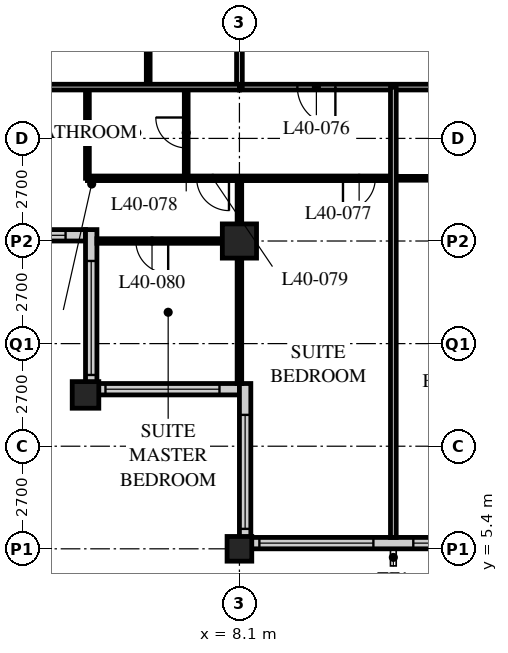
"""IFC4 building model, lengths in metres.
Left out: names, types, materials, properties, quantities, classifications, styles, units other than length and angle.
Written with IfcOpenShell. Run it as: python <this file> out.ifc"""

import sys

from ifc_helpers import new_model, si_unit, direction, frame, frame_2d, origin, origin_2d, place, context, subcontext, project, spatial, rectangle, hollow_rectangle, extrude, element, fill, save


model = new_model("IFC4")
c1 = context("Model", 3, precision=1e-05, world=origin(), true_north=direction((0.0, 1.0)))
c2 = subcontext(c1, "Body", "Model", "MODEL_VIEW")
j1 = project(units=[si_unit("LENGTHUNIT", "METRE"), si_unit("PLANEANGLEUNIT", "RADIAN")], contexts=[c1])
p1 = place(None, origin())
s1 = spatial("IfcSite", under=j1, at=p1, CompositionType="ELEMENT")
p2 = place(p1, origin())
s2 = spatial("IfcBuilding", under=s1, at=p2, CompositionType="ELEMENT")
p3 = place(p2, frame((0.0, 0.0, 154.4)))
s3 = spatial("IfcBuildingStorey", under=s2, at=p3, CompositionType="ELEMENT", Elevation=154.4)
p4 = place(p3, frame((4.05, 9.45, 0.0), z_axis=(0.0, 0.0, 1.0), x_axis=(1.0, 0.0, 0.0)))
e1 = element("IfcColumn", 1, at=p4, inside=s3, PredefinedType="COLUMN", context=c2, shape_type="SweptSolid", body=[
    extrude(hollow_rectangle(XDim=0.7, YDim=0.7, WallThickness=0.07, at=origin_2d()), origin(), (0.0, 0.0, 1.0), 3.4),
])
p5 = place(p3, frame((8.1, 5.4, 0.0), z_axis=(0.0, 0.0, 1.0), x_axis=(1.0, 0.0, 0.0)))
e2 = element("IfcColumn", 2, at=p5, inside=s3, PredefinedType="COLUMN", context=c2, shape_type="SweptSolid", body=[
    extrude(hollow_rectangle(XDim=0.65, YDim=0.65, WallThickness=0.055, at=origin_2d()), origin(), (0.0, 0.0, 1.0), 3.4),
])
p6 = place(p3, frame((8.1, 13.5, 0.0), z_axis=(0.0, 0.0, 1.0), x_axis=(1.0, 0.0, 0.0)))
e3 = element("IfcColumn", 3, at=p6, inside=s3, PredefinedType="COLUMN", context=c2, shape_type="SweptSolid", body=[
    extrude(hollow_rectangle(XDim=0.9, YDim=0.9, WallThickness=0.1, at=origin_2d()), origin(), (0.0, 0.0, 1.0), 3.4),
])
p7 = place(p3, frame((8.4, 5.55, 0.0), z_axis=(0.0, 0.0, 1.0), x_axis=(1.0, 0.0, 0.0)))
e4 = element("IfcWall", 4, at=p7, inside=s3, PredefinedType="SOLIDWALL", context=c2, shape_type="SweptSolid", body=[
    extrude(rectangle(XDim=40.2, YDim=0.3, at=frame_2d((20.1, 0.0))), origin(), (0.0, 0.0, 1.0), 2.15),
])
p8 = place(p7, frame((0.225, 0.0, 0.9)))
e5 = element("IfcOpeningElement", 5, at=p8, cuts=e4, PredefinedType="OPENING", context=c2, shape_type="SweptSolid", body=[
    extrude(rectangle(XDim=3.0, YDim=1.2, at=frame_2d((1.5, 0.6))), frame((0.0, 0.16, 0.0), z_axis=(0.0, -1.0, 0.0), x_axis=(1.0, 0.0, 0.0)), (0.0, 0.0, 1.0), 0.32),
])
p9 = place(p7, frame((4.275, 0.0, 0.9)))
e6 = element("IfcOpeningElement", 6, at=p9, cuts=e4, PredefinedType="OPENING", context=c2, shape_type="SweptSolid", body=[
    extrude(rectangle(XDim=3.0, YDim=1.2, at=frame_2d((1.5, 0.6))), frame((0.0, 0.16, 0.0), z_axis=(0.0, -1.0, 0.0), x_axis=(1.0, 0.0, 0.0)), (0.0, 0.0, 1.0), 0.32),
])
p10 = place(p7, frame((8.325, 0.0, 0.9)))
e7 = element("IfcOpeningElement", 7, at=p10, cuts=e4, PredefinedType="OPENING", context=c2, shape_type="SweptSolid", body=[
    extrude(rectangle(XDim=3.0, YDim=1.2, at=frame_2d((1.5, 0.6))), frame((0.0, 0.16, 0.0), z_axis=(0.0, -1.0, 0.0), x_axis=(1.0, 0.0, 0.0)), (0.0, 0.0, 1.0), 0.32),
])
p11 = place(p7, frame((12.375, 0.0, 0.9)))
e8 = element("IfcOpeningElement", 8, at=p11, cuts=e4, PredefinedType="OPENING", context=c2, shape_type="SweptSolid", body=[
    extrude(rectangle(XDim=3.0, YDim=1.2, at=frame_2d((1.5, 0.6))), frame((0.0, 0.16, 0.0), z_axis=(0.0, -1.0, 0.0), x_axis=(1.0, 0.0, 0.0)), (0.0, 0.0, 1.0), 0.32),
])
p12 = place(p7, frame((16.425, 0.0, 0.9)))
e9 = element("IfcOpeningElement", 9, at=p12, cuts=e4, PredefinedType="OPENING", context=c2, shape_type="SweptSolid", body=[
    extrude(rectangle(XDim=3.0, YDim=1.2, at=frame_2d((1.5, 0.6))), frame((0.0, 0.16, 0.0), z_axis=(0.0, -1.0, 0.0), x_axis=(1.0, 0.0, 0.0)), (0.0, 0.0, 1.0), 0.32),
])
p13 = place(p7, frame((20.475, 0.0, 0.9)))
e10 = element("IfcOpeningElement", 10, at=p13, cuts=e4, PredefinedType="OPENING", context=c2, shape_type="SweptSolid", body=[
    extrude(rectangle(XDim=3.0, YDim=1.2, at=frame_2d((1.5, 0.6))), frame((0.0, 0.16, 0.0), z_axis=(0.0, -1.0, 0.0), x_axis=(1.0, 0.0, 0.0)), (0.0, 0.0, 1.0), 0.32),
])
p14 = place(p7, frame((24.525, 0.0, 0.9)))
e11 = element("IfcOpeningElement", 11, at=p14, cuts=e4, PredefinedType="OPENING", context=c2, shape_type="SweptSolid", body=[
    extrude(rectangle(XDim=3.0, YDim=1.2, at=frame_2d((1.5, 0.6))), frame((0.0, 0.16, 0.0), z_axis=(0.0, -1.0, 0.0), x_axis=(1.0, 0.0, 0.0)), (0.0, 0.0, 1.0), 0.32),
])
p15 = place(p7, frame((28.575, 0.0, 0.9)))
e12 = element("IfcOpeningElement", 12, at=p15, cuts=e4, PredefinedType="OPENING", context=c2, shape_type="SweptSolid", body=[
    extrude(rectangle(XDim=3.0, YDim=1.2, at=frame_2d((1.5, 0.6))), frame((0.0, 0.16, 0.0), z_axis=(0.0, -1.0, 0.0), x_axis=(1.0, 0.0, 0.0)), (0.0, 0.0, 1.0), 0.32),
])
p16 = place(p7, frame((32.625, 0.0, 0.9)))
e13 = element("IfcOpeningElement", 13, at=p16, cuts=e4, PredefinedType="OPENING", context=c2, shape_type="SweptSolid", body=[
    extrude(rectangle(XDim=3.0, YDim=1.2, at=frame_2d((1.5, 0.6))), frame((0.0, 0.16, 0.0), z_axis=(0.0, -1.0, 0.0), x_axis=(1.0, 0.0, 0.0)), (0.0, 0.0, 1.0), 0.32),
])
p17 = place(p7, frame((36.675, 0.0, 0.9)))
e14 = element("IfcOpeningElement", 14, at=p17, cuts=e4, PredefinedType="OPENING", context=c2, shape_type="SweptSolid", body=[
    extrude(rectangle(XDim=3.0, YDim=1.2, at=frame_2d((1.5, 0.6))), frame((0.0, 0.16, 0.0), z_axis=(0.0, -1.0, 0.0), x_axis=(1.0, 0.0, 0.0)), (0.0, 0.0, 1.0), 0.32),
])
p18 = place(p3, frame((0.3, 13.65, 0.0), z_axis=(0.0, 0.0, 1.0), x_axis=(1.0, 0.0, 0.0)))
e15 = element("IfcWall", 15, at=p18, inside=s3, PredefinedType="SOLIDWALL", context=c2, shape_type="SweptSolid", body=[
    extrude(rectangle(XDim=3.75, YDim=0.3, at=frame_2d((1.875, 0.0))), origin(), (0.0, 0.0, 1.0), 3.15),
])
p19 = place(p18, frame((0.225, 0.0, 0.9)))
e16 = element("IfcOpeningElement", 16, at=p19, cuts=e15, PredefinedType="OPENING", context=c2, shape_type="SweptSolid", body=[
    extrude(rectangle(XDim=3.0, YDim=1.2, at=frame_2d((1.5, 0.6))), frame((0.0, 0.16, 0.0), z_axis=(0.0, -1.0, 0.0), x_axis=(1.0, 0.0, 0.0)), (0.0, 0.0, 1.0), 0.32),
])
p20 = place(p3, frame((4.2, 13.8, 0.0), z_axis=(0.0, 0.0, 1.0), x_axis=(0.0, -1.0, 0.0)))
e17 = element("IfcWall", 17, at=p20, inside=s3, PredefinedType="SOLIDWALL", context=c2, shape_type="SweptSolid", body=[
    extrude(rectangle(XDim=4.35, YDim=0.3, at=frame_2d((2.175, 0.0))), origin(), (0.0, 0.0, 1.0), 2.45),
])
p21 = place(p20, frame((0.825, 0.0, 0.9)))
e18 = element("IfcOpeningElement", 18, at=p21, cuts=e17, PredefinedType="OPENING", context=c2, shape_type="SweptSolid", body=[
    extrude(rectangle(XDim=3.0, YDim=1.2, at=frame_2d((1.5, 0.6))), frame((0.0, 0.16, 0.0), z_axis=(0.0, -1.0, 0.0), x_axis=(1.0, 0.0, 0.0)), (0.0, 0.0, 1.0), 0.32),
])
p22 = place(p3, frame((4.35, 9.6, 0.0), z_axis=(0.0, 0.0, 1.0), x_axis=(1.0, 0.0, 0.0)))
e19 = element("IfcWall", 19, at=p22, inside=s3, PredefinedType="SOLIDWALL", context=c2, shape_type="SweptSolid", body=[
    extrude(rectangle(XDim=3.75, YDim=0.3, at=frame_2d((1.875, 0.0))), origin(), (0.0, 0.0, 1.0), 2.45),
])
p23 = place(p22, frame((0.225, 0.0, 0.9)))
e20 = element("IfcOpeningElement", 20, at=p23, cuts=e19, PredefinedType="OPENING", context=c2, shape_type="SweptSolid", body=[
    extrude(rectangle(XDim=3.0, YDim=1.2, at=frame_2d((1.5, 0.6))), frame((0.0, 0.16, 0.0), z_axis=(0.0, -1.0, 0.0), x_axis=(1.0, 0.0, 0.0)), (0.0, 0.0, 1.0), 0.32),
])
p24 = place(p3, frame((8.25, 9.75, 0.0), z_axis=(0.0, 0.0, 1.0), x_axis=(0.0, -1.0, 0.0)))
e21 = element("IfcWall", 21, at=p24, inside=s3, PredefinedType="SOLIDWALL", context=c2, shape_type="SweptSolid", body=[
    extrude(rectangle(XDim=4.35, YDim=0.3, at=frame_2d((2.175, 0.0))), origin(), (0.0, 0.0, 1.0), 2.15),
])
p25 = place(p24, frame((0.825, 0.0, 0.9)))
e22 = element("IfcOpeningElement", 22, at=p25, cuts=e21, PredefinedType="OPENING", context=c2, shape_type="SweptSolid", body=[
    extrude(rectangle(XDim=3.0, YDim=1.2, at=frame_2d((1.5, 0.6))), frame((0.0, 0.16, 0.0), z_axis=(0.0, -1.0, 0.0), x_axis=(1.0, 0.0, 0.0)), (0.0, 0.0, 1.0), 0.32),
])
p26 = place(p3, frame((8.1, 17.55, 0.0), z_axis=(0.0, 0.0, 1.0), x_axis=(1.0, 0.0, 0.0)))
e23 = element("IfcWall", 23, at=p26, inside=s3, PredefinedType="PARTITIONING", context=c2, shape_type="SweptSolid", body=[
    extrude(rectangle(XDim=40.5, YDim=0.15, at=frame_2d((20.25, 0.0))), origin(), (0.0, 0.0, 1.0), 3.15),
])
p27 = place(p26, frame((10.0, 0.0, 0.0)))
e24 = element("IfcOpeningElement", 24, at=p27, cuts=e23, PredefinedType="OPENING", context=c2, shape_type="SweptSolid", body=[
    extrude(rectangle(XDim=1.0, YDim=2.1, at=frame_2d((0.5, 1.05))), frame((0.0, 0.085, 0.0), z_axis=(0.0, -1.0, 0.0), x_axis=(1.0, 0.0, 0.0)), (0.0, 0.0, 1.0), 0.17),
])
p28 = place(p26, frame((22.15, 0.0, 0.0)))
e25 = element("IfcOpeningElement", 25, at=p28, cuts=e23, PredefinedType="OPENING", context=c2, shape_type="SweptSolid", body=[
    extrude(rectangle(XDim=1.0, YDim=2.1, at=frame_2d((0.5, 1.05))), frame((0.0, 0.085, 0.0), z_axis=(0.0, -1.0, 0.0), x_axis=(1.0, 0.0, 0.0)), (0.0, 0.0, 1.0), 0.17),
])
p29 = place(p26, frame((30.8, 0.0, 0.0)))
e26 = element("IfcOpeningElement", 26, at=p29, cuts=e23, PredefinedType="OPENING", context=c2, shape_type="SweptSolid", body=[
    extrude(rectangle(XDim=1.0, YDim=2.1, at=frame_2d((0.5, 1.05))), frame((0.0, 0.085, 0.0), z_axis=(0.0, -1.0, 0.0), x_axis=(1.0, 0.0, 0.0)), (0.0, 0.0, 1.0), 0.17),
])
p30 = place(p26, frame((34.85, 0.0, 0.0)))
e27 = element("IfcOpeningElement", 27, at=p30, cuts=e23, PredefinedType="OPENING", context=c2, shape_type="SweptSolid", body=[
    extrude(rectangle(XDim=1.0, YDim=2.1, at=frame_2d((0.5, 1.05))), frame((0.0, 0.085, 0.0), z_axis=(0.0, -1.0, 0.0), x_axis=(1.0, 0.0, 0.0)), (0.0, 0.0, 1.0), 0.17),
])
p31 = place(p26, frame((1.525, 0.0, 0.0)))
e28 = element("IfcOpeningElement", 28, at=p31, cuts=e23, PredefinedType="OPENING", context=c2, shape_type="SweptSolid", body=[
    extrude(rectangle(XDim=1.0, YDim=2.1, at=frame_2d((0.5, 1.05))), frame((0.0, 0.085, 0.0), z_axis=(0.0, -1.0, 0.0), x_axis=(1.0, 0.0, 0.0)), (0.0, 0.0, 1.0), 0.17),
])
p32 = place(p26, frame((37.975, 0.0, 0.0)))
e29 = element("IfcOpeningElement", 29, at=p32, cuts=e23, PredefinedType="OPENING", context=c2, shape_type="SweptSolid", body=[
    extrude(rectangle(XDim=1.0, YDim=2.1, at=frame_2d((0.5, 1.05))), frame((0.0, 0.085, 0.0), z_axis=(0.0, -1.0, 0.0), x_axis=(1.0, 0.0, 0.0)), (0.0, 0.0, 1.0), 0.17),
])
p33 = place(p3, frame((8.1, 17.55, 0.0), z_axis=(0.0, 0.0, 1.0), x_axis=(0.0, 1.0, 0.0)))
e30 = element("IfcWall", 30, at=p33, inside=s3, PredefinedType="PARTITIONING", context=c2, shape_type="SweptSolid", body=[
    extrude(rectangle(XDim=28.35, YDim=0.15, at=frame_2d((14.175, 0.0))), origin(), (0.0, 0.0, 1.0), 2.15),
])
p34 = place(p33, frame((5.95, 0.0, 0.0)))
e31 = element("IfcOpeningElement", 31, at=p34, cuts=e30, PredefinedType="OPENING", context=c2, shape_type="SweptSolid", body=[
    extrude(rectangle(XDim=1.0, YDim=2.1, at=frame_2d((0.5, 1.05))), frame((0.0, 0.085, 0.0), z_axis=(0.0, -1.0, 0.0), x_axis=(1.0, 0.0, 0.0)), (0.0, 0.0, 1.0), 0.17),
])
p35 = place(p33, frame((16.8, 0.0, 0.0)))
e32 = element("IfcOpeningElement", 32, at=p35, cuts=e30, PredefinedType="OPENING", context=c2, shape_type="SweptSolid", body=[
    extrude(rectangle(XDim=1.0, YDim=2.1, at=frame_2d((0.5, 1.05))), frame((0.0, 0.085, 0.0), z_axis=(0.0, -1.0, 0.0), x_axis=(1.0, 0.0, 0.0)), (0.0, 0.0, 1.0), 0.17),
])
p36 = place(p33, frame((22.7, 0.0, 0.0)))
e33 = element("IfcOpeningElement", 33, at=p36, cuts=e30, PredefinedType="OPENING", context=c2, shape_type="SweptSolid", body=[
    extrude(rectangle(XDim=1.0, YDim=2.1, at=frame_2d((0.5, 1.05))), frame((0.0, 0.085, 0.0), z_axis=(0.0, -1.0, 0.0), x_axis=(1.0, 0.0, 0.0)), (0.0, 0.0, 1.0), 0.17),
])
p37 = place(p33, frame((24.9, 0.0, 0.0)))
e34 = element("IfcOpeningElement", 34, at=p37, cuts=e30, PredefinedType="OPENING", context=c2, shape_type="SweptSolid", body=[
    extrude(rectangle(XDim=1.0, YDim=2.1, at=frame_2d((0.5, 1.05))), frame((0.0, 0.085, 0.0), z_axis=(0.0, -1.0, 0.0), x_axis=(1.0, 0.0, 0.0)), (0.0, 0.0, 1.0), 0.17),
])
p38 = place(p3, frame((12.15, 15.15, 0.0), z_axis=(0.0, 0.0, 1.0), x_axis=(1.0, 0.0, 0.0)))
e35 = element("IfcWall", 35, at=p38, inside=s3, PredefinedType="PARTITIONING", context=c2, shape_type="SweptSolid", body=[
    extrude(rectangle(XDim=2.6, YDim=0.1, at=frame_2d((1.3, 0.0))), origin(), (0.0, 0.0, 1.0), 3.15),
])
p39 = place(p3, frame((5.7, 17.55, 0.0), z_axis=(0.0, 0.0, 1.0), x_axis=(0.0, 1.0, 0.0)))
e36 = element("IfcWall", 36, at=p39, inside=s3, PredefinedType="PARTITIONING", context=c2, shape_type="SweptSolid", body=[
    extrude(rectangle(XDim=2.6, YDim=0.1, at=frame_2d((1.3, 0.0))), origin(), (0.0, 0.0, 1.0), 3.15),
])
p40 = place(p3, frame((6.7, 17.55, 0.0), z_axis=(0.0, 0.0, 1.0), x_axis=(0.0, -1.0, 0.0)))
e37 = element("IfcWall", 37, at=p40, inside=s3, PredefinedType="PARTITIONING", context=c2, shape_type="SweptSolid", body=[
    extrude(rectangle(XDim=2.4, YDim=0.1, at=frame_2d((1.2, 0.0))), origin(), (0.0, 0.0, 1.0), 3.15),
])
p41 = place(p40, frame((0.8, 0.0, 0.0)))
e38 = element("IfcOpeningElement", 38, at=p41, cuts=e37, PredefinedType="OPENING", context=c2, shape_type="SweptSolid", body=[
    extrude(rectangle(XDim=0.8, YDim=2.1, at=frame_2d((0.4, 1.05))), frame((0.0, 0.06, 0.0), z_axis=(0.0, -1.0, 0.0), x_axis=(1.0, 0.0, 0.0)), (0.0, 0.0, 1.0), 0.12),
])
p42 = place(p3, frame((4.1, 17.55, 0.0), z_axis=(0.0, 0.0, 1.0), x_axis=(0.0, -1.0, 0.0)))
e39 = element("IfcWall", 39, at=p42, inside=s3, PredefinedType="PARTITIONING", context=c2, shape_type="SweptSolid", body=[
    extrude(rectangle(XDim=2.4, YDim=0.1, at=frame_2d((1.2, 0.0))), origin(), (0.0, 0.0, 1.0), 3.15),
])
p43 = place(p3, frame((4.1, 15.15, 0.0), z_axis=(0.0, 0.0, 1.0), x_axis=(1.0, 0.0, 0.0)))
e40 = element("IfcWall", 40, at=p43, inside=s3, PredefinedType="PARTITIONING", context=c2, shape_type="SweptSolid", body=[
    extrude(rectangle(XDim=8.05, YDim=0.12, at=frame_2d((4.025, 0.0))), origin(), (0.0, 0.0, 1.0), 3.15),
])
p44 = place(p43, frame((6.725, 0.0, 0.0)))
e41 = element("IfcOpeningElement", 41, at=p44, cuts=e40, PredefinedType="OPENING", context=c2, shape_type="SweptSolid", body=[
    extrude(rectangle(XDim=0.85, YDim=2.1, at=frame_2d((0.425, 1.05))), frame((0.0, 0.07, 0.0), z_axis=(0.0, -1.0, 0.0), x_axis=(1.0, 0.0, 0.0)), (0.0, 0.0, 1.0), 0.14),
])
p45 = place(p43, frame((2.875, 0.0, 0.0)))
e42 = element("IfcOpeningElement", 42, at=p45, cuts=e40, PredefinedType="OPENING", context=c2, shape_type="SweptSolid", body=[
    extrude(rectangle(XDim=0.85, YDim=2.1, at=frame_2d((0.425, 1.05))), frame((0.0, 0.07, 0.0), z_axis=(0.0, -1.0, 0.0), x_axis=(1.0, 0.0, 0.0)), (0.0, 0.0, 1.0), 0.14),
])
p46 = place(p3, frame((8.1, 15.15, 0.0), z_axis=(0.0, 0.0, 1.0), x_axis=(0.0, -1.0, 0.0)))
e43 = element("IfcWall", 43, at=p46, inside=s3, PredefinedType="PARTITIONING", context=c2, shape_type="SweptSolid", body=[
    extrude(rectangle(XDim=5.4, YDim=0.12, at=frame_2d((2.7, 0.0))), origin(), (0.0, 0.0, 1.0), 2.15),
])
p47 = place(p3, frame((8.1, 13.5, 0.0), z_axis=(0.0, 0.0, 1.0), x_axis=(-1.0, 0.0, 0.0)))
e44 = element("IfcWall", 44, at=p47, inside=s3, PredefinedType="PARTITIONING", context=c2, shape_type="SweptSolid", body=[
    extrude(rectangle(XDim=3.75, YDim=0.12, at=frame_2d((1.875, 0.0))), origin(), (0.0, 0.0, 1.0), 2.38),
])
p48 = place(p47, frame((1.875, 0.0, 0.0)))
e45 = element("IfcOpeningElement", 45, at=p48, cuts=e44, PredefinedType="OPENING", context=c2, shape_type="SweptSolid", body=[
    extrude(rectangle(XDim=0.85, YDim=2.1, at=frame_2d((0.425, 1.05))), frame((0.0, 0.07, 0.0), z_axis=(0.0, -1.0, 0.0), x_axis=(1.0, 0.0, 0.0)), (0.0, 0.0, 1.0), 0.14),
])
p49 = place(p3, frame((0.3, 17.55, 0.0), z_axis=(0.0, 0.0, 1.0), x_axis=(1.0, 0.0, 0.0)))
e46 = element("IfcWall", 46, at=p49, inside=s3, PredefinedType="PARTITIONING", context=c2, shape_type="SweptSolid", body=[
    extrude(rectangle(XDim=7.8, YDim=0.15, at=frame_2d((3.9, 0.0))), origin(), (0.0, 0.0, 1.0), 3.15),
])
p50 = place(p3, frame((12.15, 17.55, 0.0), z_axis=(0.0, 0.0, 1.0), x_axis=(0.0, -1.0, 0.0)))
e47 = element("IfcWall", 47, at=p50, inside=s3, PredefinedType="PARTITIONING", context=c2, shape_type="SweptSolid", body=[
    extrude(rectangle(XDim=11.85, YDim=0.15, at=frame_2d((5.925, 0.0))), origin(), (0.0, 0.0, 1.0), 3.15),
])
p51 = place(p8, origin())
e48 = element("IfcWindow", 48, at=p51, inside=s3, PartitioningType="SINGLE_PANEL", PredefinedType="WINDOW", context=c2, shape_type="SweptSolid", body=[
    extrude(rectangle(XDim=3.0, YDim=1.2, at=frame_2d((1.5, 0.6))), frame((0.0, 0.03, 0.0), z_axis=(0.0, -1.0, 0.0), x_axis=(1.0, 0.0, 0.0)), (0.0, 0.0, 1.0), 0.06),
])
fill(e5, e48)
p52 = place(p9, origin())
e49 = element("IfcWindow", 49, at=p52, inside=s3, PartitioningType="SINGLE_PANEL", PredefinedType="WINDOW", context=c2, shape_type="SweptSolid", body=[
    extrude(rectangle(XDim=3.0, YDim=1.2, at=frame_2d((1.5, 0.6))), frame((0.0, 0.03, 0.0), z_axis=(0.0, -1.0, 0.0), x_axis=(1.0, 0.0, 0.0)), (0.0, 0.0, 1.0), 0.06),
])
fill(e6, e49)
p53 = place(p19, origin())
e50 = element("IfcWindow", 50, at=p53, inside=s3, PartitioningType="SINGLE_PANEL", PredefinedType="WINDOW", context=c2, shape_type="SweptSolid", body=[
    extrude(rectangle(XDim=3.0, YDim=1.2, at=frame_2d((1.5, 0.6))), frame((0.0, 0.03, 0.0), z_axis=(0.0, -1.0, 0.0), x_axis=(1.0, 0.0, 0.0)), (0.0, 0.0, 1.0), 0.06),
])
fill(e16, e50)
p54 = place(p21, origin())
e51 = element("IfcWindow", 51, at=p54, inside=s3, PartitioningType="SINGLE_PANEL", PredefinedType="WINDOW", context=c2, shape_type="SweptSolid", body=[
    extrude(rectangle(XDim=3.0, YDim=1.2, at=frame_2d((1.5, 0.6))), frame((0.0, 0.03, 0.0), z_axis=(0.0, -1.0, 0.0), x_axis=(1.0, 0.0, 0.0)), (0.0, 0.0, 1.0), 0.06),
])
fill(e18, e51)
p55 = place(p23, origin())
e52 = element("IfcWindow", 52, at=p55, inside=s3, PartitioningType="SINGLE_PANEL", PredefinedType="WINDOW", context=c2, shape_type="SweptSolid", body=[
    extrude(rectangle(XDim=3.0, YDim=1.2, at=frame_2d((1.5, 0.6))), frame((0.0, 0.03, 0.0), z_axis=(0.0, -1.0, 0.0), x_axis=(1.0, 0.0, 0.0)), (0.0, 0.0, 1.0), 0.06),
])
fill(e20, e52)
p56 = place(p25, origin())
e53 = element("IfcWindow", 53, at=p56, inside=s3, PartitioningType="SINGLE_PANEL", PredefinedType="WINDOW", context=c2, shape_type="SweptSolid", body=[
    extrude(rectangle(XDim=3.0, YDim=1.2, at=frame_2d((1.5, 0.6))), frame((0.0, 0.03, 0.0), z_axis=(0.0, -1.0, 0.0), x_axis=(1.0, 0.0, 0.0)), (0.0, 0.0, 1.0), 0.06),
])
fill(e22, e53)
p57 = place(p31, origin())
e54 = element("IfcDoor", 54, at=p57, inside=s3, OperationType="SINGLE_SWING_LEFT", PredefinedType="DOOR", context=c2, shape_type="SweptSolid", body=[
    extrude(rectangle(XDim=1.0, YDim=2.1, at=frame_2d((0.5, 1.05))), frame((0.0, 0.025, 0.0), z_axis=(0.0, -1.0, 0.0), x_axis=(1.0, 0.0, 0.0)), (0.0, 0.0, 1.0), 0.05),
])
fill(e28, e54)
p58 = place(p44, origin())
e55 = element("IfcDoor", 55, at=p58, inside=s3, OperationType="SINGLE_SWING_RIGHT", PredefinedType="DOOR", context=c2, shape_type="SweptSolid", body=[
    extrude(rectangle(XDim=0.85, YDim=2.1, at=frame_2d((0.425, 1.05))), frame((0.0, 0.025, 0.0), z_axis=(0.0, -1.0, 0.0), x_axis=(1.0, 0.0, 0.0)), (0.0, 0.0, 1.0), 0.05),
])
fill(e41, e55)
p59 = place(p41, origin())
e56 = element("IfcDoor", 56, at=p59, inside=s3, OperationType="SINGLE_SWING_RIGHT", PredefinedType="DOOR", context=c2, shape_type="SweptSolid", body=[
    extrude(rectangle(XDim=0.8, YDim=2.1, at=frame_2d((0.4, 1.05))), frame((0.0, 0.025, 0.0), z_axis=(0.0, -1.0, 0.0), x_axis=(1.0, 0.0, 0.0)), (0.0, 0.0, 1.0), 0.05),
])
fill(e38, e56)
p60 = place(p45, origin())
e57 = element("IfcDoor", 57, at=p60, inside=s3, OperationType="SINGLE_SWING_LEFT", PredefinedType="DOOR", context=c2, shape_type="SweptSolid", body=[
    extrude(rectangle(XDim=0.85, YDim=2.1, at=frame_2d((0.425, 1.05))), frame((0.0, 0.025, 0.0), z_axis=(0.0, -1.0, 0.0), x_axis=(1.0, 0.0, 0.0)), (0.0, 0.0, 1.0), 0.05),
])
fill(e42, e57)
p61 = place(p48, origin())
e58 = element("IfcDoor", 58, at=p61, inside=s3, OperationType="SINGLE_SWING_LEFT", PredefinedType="DOOR", context=c2, shape_type="SweptSolid", body=[
    extrude(rectangle(XDim=0.85, YDim=2.1, at=frame_2d((0.425, 1.05))), frame((0.0, 0.025, 0.0), z_axis=(0.0, -1.0, 0.0), x_axis=(1.0, 0.0, 0.0)), (0.0, 0.0, 1.0), 0.05),
])
fill(e45, e58)
save(model, sys.argv[1])
